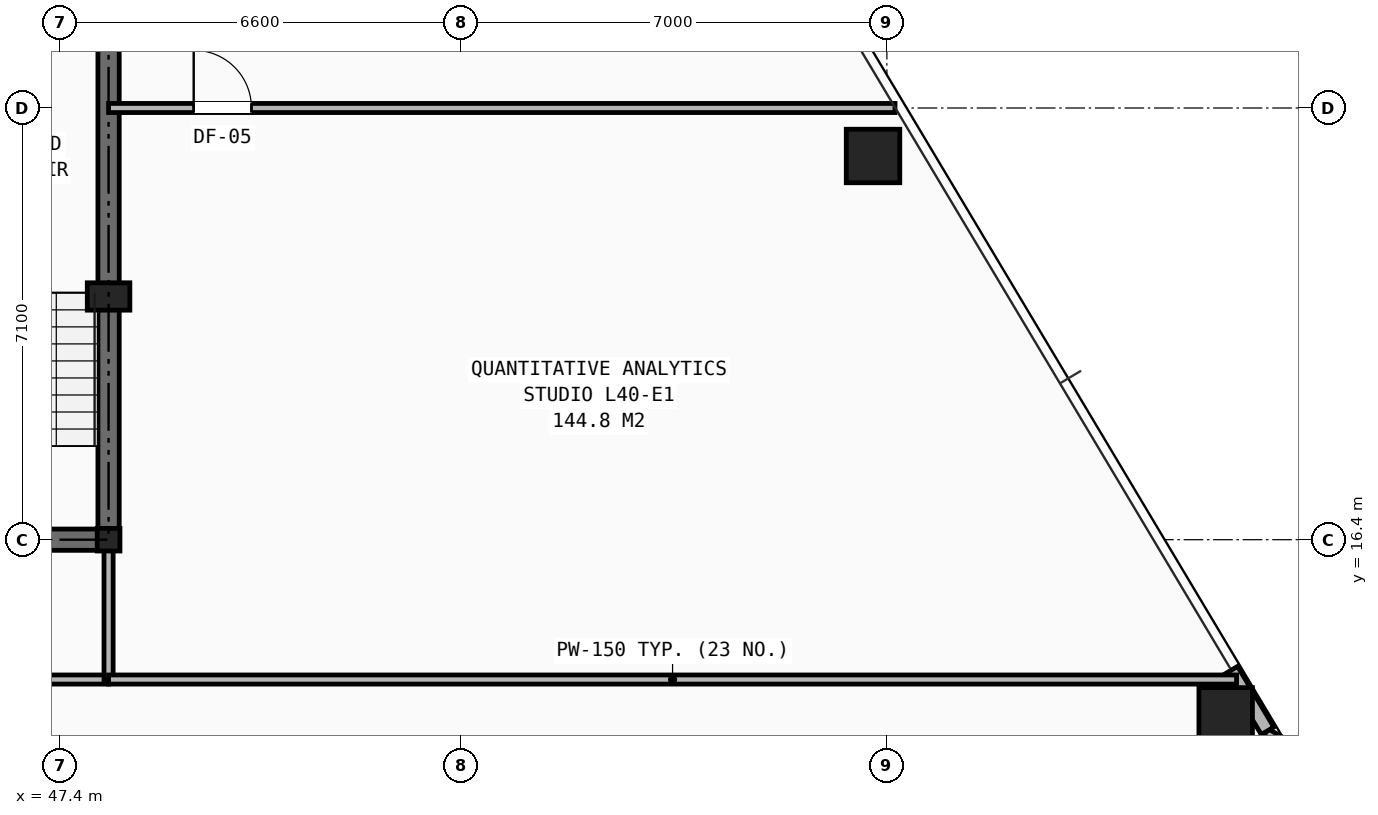
"""IFC4 building model, lengths in metres.
Left out: names, types, materials, properties, quantities, classifications, styles, units other than length and angle.
Written with IfcOpenShell. Run it as: python <this file> out.ifc"""

import sys

from ifc_helpers import new_model, si_unit, direction, frame, frame_2d, origin, origin_2d, place, context, subcontext, project, spatial, rectangle, hollow_rectangle, i_section, extrude, element, fill, save


model = new_model("IFC4")
c1 = context("Model", 3, precision=1e-05, world=origin(), true_north=direction((0.0, 1.0)))
c2 = subcontext(c1, "Body", "Model", "MODEL_VIEW")
j1 = project(units=[si_unit("LENGTHUNIT", "METRE"), si_unit("PLANEANGLEUNIT", "RADIAN")], contexts=[c1])
p1 = place(None, origin())
s1 = spatial("IfcSite", under=j1, at=p1, CompositionType="ELEMENT")
p2 = place(p1, origin())
s2 = spatial("IfcBuilding", under=s1, at=p2, CompositionType="ELEMENT")
p3 = place(p2, frame((0.0, 0.0, 140.15)))
s3 = spatial("IfcBuildingStorey", under=s2, at=p3, CompositionType="ELEMENT", Elevation=140.15)
p4 = place(p3, frame((48.2, 16.4, 0.0), z_axis=(0.0, 0.0, 1.0), x_axis=(1.0, 0.0, 0.0)))
e1 = element("IfcColumn", 1, at=p4, inside=s3, PredefinedType="COLUMN", context=c2, shape_type="SweptSolid", body=[
    extrude(i_section(OverallWidth=0.374, OverallDepth=0.372, WebThickness=0.016, FlangeThickness=0.026, at=origin_2d()), origin(), (0.0, 0.0, 1.0), 3.45),
])
p5 = place(p3, frame((48.2, 20.4, 0.0), z_axis=(0.0, 0.0, 1.0), x_axis=(1.0, 0.0, 0.0)))
e2 = element("IfcColumn", 2, at=p5, inside=s3, PredefinedType="PILASTER", context=c2, shape_type="SweptSolid", body=[
    extrude(rectangle(XDim=0.7, YDim=0.45, at=origin_2d()), origin(), (0.0, 0.0, 1.0), 3.45),
])
for number, where, z_axis, x_axis in (
    (3, (66.572, 13.527, 0.0), (0.0, 0.0, 1.0), (1.0, 0.0, 0.0)),
    (4, (60.772, 22.711, 0.0), (0.0, 0.0, 1.0), (1.0, 0.0, 0.0)),
):
    element("IfcColumn", number, at=place(p3, frame(where, z_axis=z_axis, x_axis=x_axis)), inside=s3, PredefinedType="COLUMN", context=c2, shape_type="SweptSolid", body=[
        extrude(hollow_rectangle(XDim=0.88, YDim=0.88, WallThickness=0.06, at=origin_2d()), origin(), (0.0, 0.0, 1.0), 3.45),
    ])
p6 = place(p3, frame((67.372, 13.23, 0.0), z_axis=(0.0, 0.0, 1.0), x_axis=(-0.500012768347, -0.86601803185, 0.0)))
e5 = element("IfcWall", 5, at=p6, inside=s3, PredefinedType="SHEAR", context=c2, shape_type="SweptSolid", body=[
    extrude(rectangle(XDim=8.371, YDim=0.24, at=frame_2d((4.186, 0.0))), origin(), (0.0, 0.0, 1.0), 2.583),
])
p7 = place(p3, frame((67.26, 13.257, 0.0), z_axis=(0.0, 0.0, 1.0), x_axis=(-0.512919581386, 0.858436662213, 0.0)))
e6 = element("IfcWall", 6, at=p7, inside=s3, PredefinedType="SHEAR", context=c2, shape_type="SweptSolid", body=[
    extrude(rectangle(XDim=1.162, YDim=0.24, at=frame_2d((0.581, 0.0))), origin(), (0.0, 0.0, 1.0), 2.583),
])
p8 = place(p3, frame((31.8, 16.4, 0.0), z_axis=(0.0, 0.0, 1.0), x_axis=(1.0, 0.0, 0.0)))
e7 = element("IfcWall", 7, at=p8, inside=s3, PredefinedType="SHEAR", context=c2, shape_type="SweptSolid", body=[
    extrude(rectangle(XDim=16.4, YDim=0.35, at=frame_2d((8.2, 0.0))), origin(), (0.0, 0.0, 1.0), 3.21),
])
p9 = place(p8, frame((7.75, 0.0, 0.0)))
e8 = element("IfcOpeningElement", 8, at=p9, cuts=e7, PredefinedType="OPENING", context=c2, shape_type="SweptSolid", body=[
    extrude(rectangle(XDim=0.9, YDim=2.1, at=frame_2d((0.45, 1.05))), frame((0.0, 0.185, 0.0), z_axis=(0.0, -1.0, 0.0), x_axis=(1.0, 0.0, 0.0)), (0.0, 0.0, 1.0), 0.37),
])
p10 = place(p8, frame((4.2, 0.0, 0.0)))
e9 = element("IfcOpeningElement", 9, at=p10, cuts=e7, PredefinedType="OPENING", context=c2, shape_type="SweptSolid", body=[
    extrude(rectangle(XDim=0.95, YDim=2.1, at=frame_2d((0.475, 1.05))), frame((0.0, 0.185, 0.0), z_axis=(0.0, -1.0, 0.0), x_axis=(1.0, 0.0, 0.0)), (0.0, 0.0, 1.0), 0.37),
])
p11 = place(p8, frame((10.6, 0.0, 0.0)))
e10 = element("IfcOpeningElement", 10, at=p11, cuts=e7, PredefinedType="OPENING", context=c2, shape_type="SweptSolid", body=[
    extrude(rectangle(XDim=0.95, YDim=2.1, at=frame_2d((0.475, 1.05))), frame((0.0, 0.185, 0.0), z_axis=(0.0, -1.0, 0.0), x_axis=(1.0, 0.0, 0.0)), (0.0, 0.0, 1.0), 0.37),
])
p12 = place(p3, frame((48.2, 16.4, 0.0), z_axis=(0.0, 0.0, 1.0), x_axis=(0.0, 1.0, 0.0)))
e11 = element("IfcWall", 11, at=p12, inside=s3, PredefinedType="SHEAR", context=c2, shape_type="SweptSolid", body=[
    extrude(rectangle(XDim=14.8, YDim=0.35, at=frame_2d((7.4, 0.0))), origin(), (0.0, 0.0, 1.0), 3.21),
])
p13 = place(p12, frame((11.0, 0.0, 0.0)))
e12 = element("IfcOpeningElement", 12, at=p13, cuts=e11, PredefinedType="OPENING", context=c2, shape_type="SweptSolid", body=[
    extrude(rectangle(XDim=1.1, YDim=2.15, at=frame_2d((0.55, 1.075))), frame((0.0, 0.185, 0.0), z_axis=(0.0, -1.0, 0.0), x_axis=(1.0, 0.0, 0.0)), (0.0, 0.0, 1.0), 0.37),
])
p14 = place(p3, frame((29.6, 14.1, 0.0), z_axis=(0.0, 0.0, 1.0), x_axis=(1.0, 0.0, 0.0)))
e13 = element("IfcWall", 13, at=p14, inside=s3, PredefinedType="PARTITIONING", context=c2, shape_type="SweptSolid", body=[
    extrude(rectangle(XDim=18.6, YDim=0.15, at=frame_2d((9.3, 0.0))), origin(), (0.0, 0.0, 1.0), 2.252),
])
p15 = place(p14, frame((0.55, 0.0, 0.0)))
e14 = element("IfcOpeningElement", 14, at=p15, cuts=e13, PredefinedType="OPENING", context=c2, shape_type="SweptSolid", body=[
    extrude(rectangle(XDim=0.95, YDim=2.1, at=frame_2d((0.475, 1.05))), frame((0.0, 0.085, 0.0), z_axis=(0.0, -1.0, 0.0), x_axis=(1.0, 0.0, 0.0)), (0.0, 0.0, 1.0), 0.17),
])
p16 = place(p3, frame((48.2, 14.1, 0.0), z_axis=(0.0, 0.0, 1.0), x_axis=(0.0, 1.0, 0.0)))
e15 = element("IfcWall", 15, at=p16, inside=s3, PredefinedType="PARTITIONING", context=c2, shape_type="SweptSolid", body=[
    extrude(rectangle(XDim=2.3, YDim=0.15, at=frame_2d((1.15, 0.0))), origin(), (0.0, 0.0, 1.0), 2.661),
])
p17 = place(p3, frame((48.2, 14.1, 0.0), z_axis=(0.0, 0.0, 1.0), x_axis=(1.0, 0.0, 0.0)))
e16 = element("IfcWall", 16, at=p17, inside=s3, PredefinedType="PARTITIONING", context=c2, shape_type="SweptSolid", body=[
    extrude(rectangle(XDim=18.551, YDim=0.15, at=frame_2d((9.275, 0.0))), origin(), (0.0, 0.0, 1.0), 2.589),
])
p18 = place(p3, frame((48.2, 23.5, 0.0), z_axis=(0.0, 0.0, 1.0), x_axis=(1.0, 0.0, 0.0)))
e17 = element("IfcWall", 17, at=p18, inside=s3, PredefinedType="PARTITIONING", context=c2, shape_type="SweptSolid", body=[
    extrude(rectangle(XDim=12.933, YDim=0.15, at=frame_2d((6.467, 0.0))), origin(), (0.0, 0.0, 1.0), 2.589),
])
p19 = place(p18, frame((1.4, 0.0, 0.0)))
e18 = element("IfcOpeningElement", 18, at=p19, cuts=e17, PredefinedType="OPENING", context=c2, shape_type="SweptSolid", body=[
    extrude(rectangle(XDim=0.95, YDim=2.1, at=frame_2d((0.475, 1.05))), frame((0.0, 0.085, 0.0), z_axis=(0.0, -1.0, 0.0), x_axis=(1.0, 0.0, 0.0)), (0.0, 0.0, 1.0), 0.17),
])
p20 = place(p19, origin())
e19 = element("IfcDoor", 19, at=p20, inside=s3, OperationType="SINGLE_SWING_LEFT", PredefinedType="DOOR", context=c2, shape_type="SweptSolid", body=[
    extrude(rectangle(XDim=0.95, YDim=2.1, at=frame_2d((0.475, 1.05))), frame((0.0, 0.025, 0.0), z_axis=(0.0, -1.0, 0.0), x_axis=(1.0, 0.0, 0.0)), (0.0, 0.0, 1.0), 0.05),
])
fill(e18, e19)
save(model, sys.argv[1])
